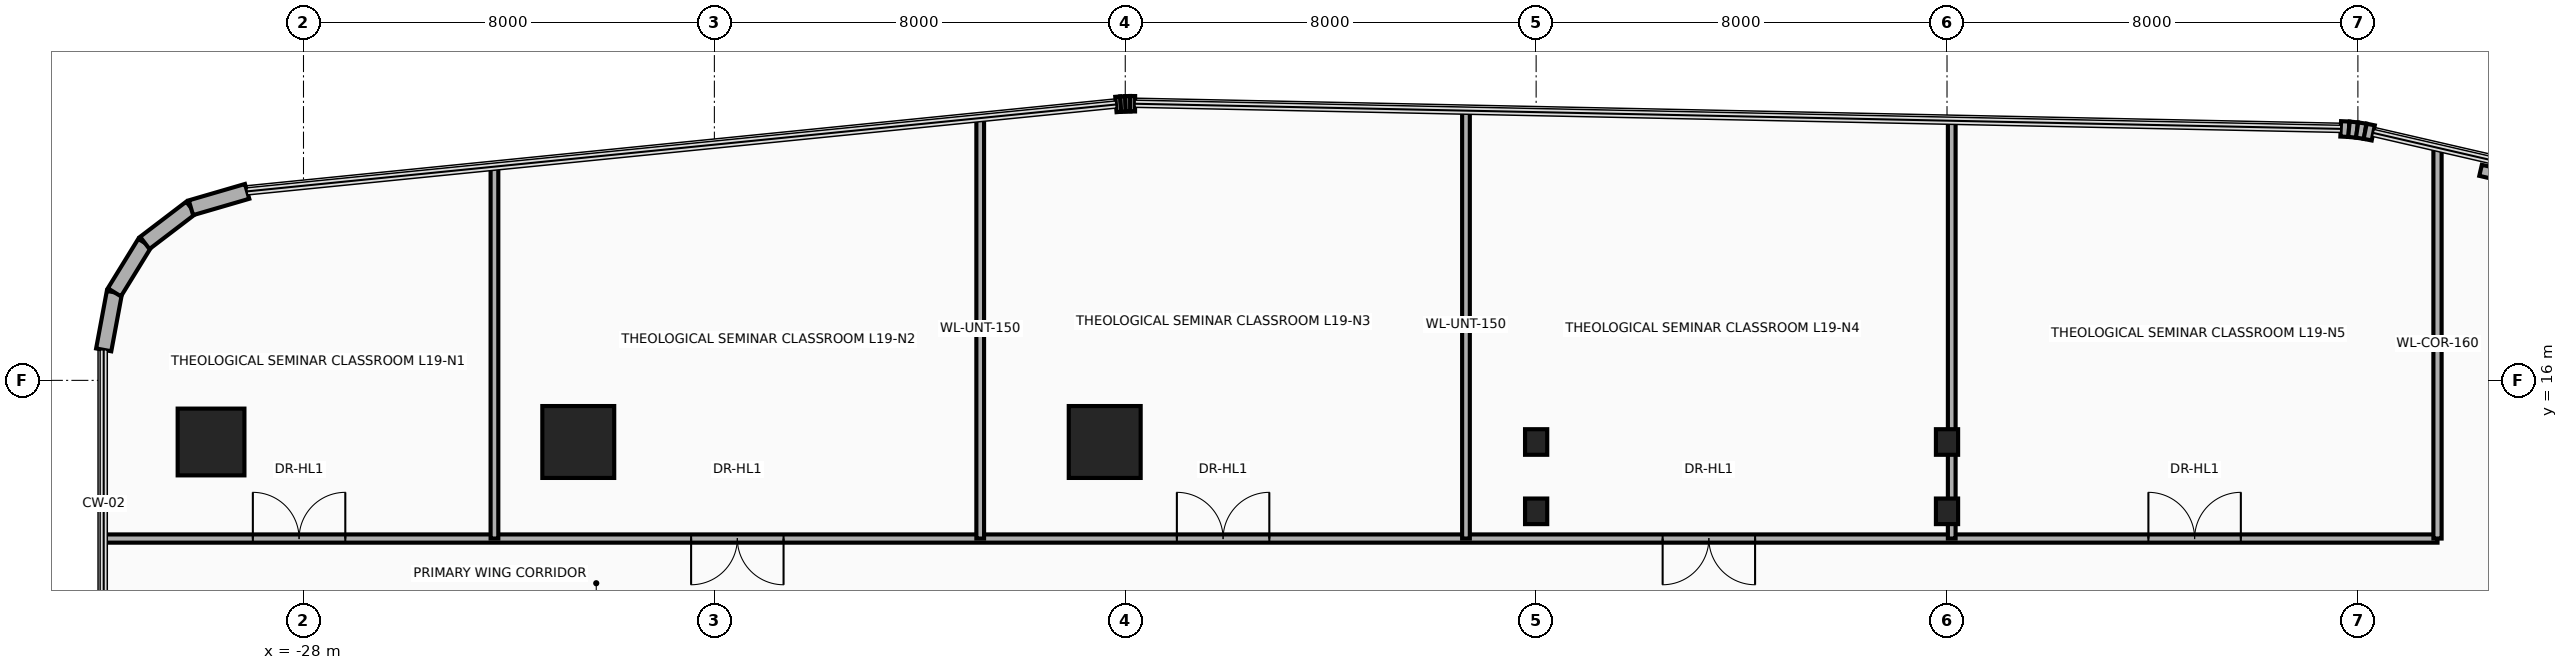
"""IFC4 building model, lengths in metres.
Left out: names, types, materials, properties, quantities, classifications, styles, units other than length and angle.
Written with IfcOpenShell. Run it as: python <this file> out.ifc"""

import sys

from ifc_helpers import new_model, si_unit, direction, frame, frame_2d, origin, origin_2d, place, context, subcontext, project, spatial, rectangle, circle, i_section, extrude, source, transform, mapped, element, fill, save


model = new_model("IFC4")
c1 = context("Model", 3, precision=1e-05, world=origin(), true_north=direction((0.0, 1.0)))
c2 = subcontext(c1, "Body", "Model", "MODEL_VIEW")
j1 = project(units=[si_unit("LENGTHUNIT", "METRE"), si_unit("PLANEANGLEUNIT", "RADIAN")], contexts=[c1])
p1 = place(None, origin())
s1 = spatial("IfcSite", under=j1, at=p1, CompositionType="ELEMENT")
p2 = place(p1, origin())
s2 = spatial("IfcBuilding", under=s1, at=p2, CompositionType="ELEMENT")
p3 = place(p2, frame((0.0, 0.0, 77.8)))
s3 = spatial("IfcBuildingStorey", under=s2, at=p3, CompositionType="ELEMENT", Elevation=77.8)
m1 = source(origin(), c2, "Body", "SweptSolid", [
    extrude(circle(Radius=0.65, at=origin_2d()), origin(), (0.0, 0.0, 1.0), 3.7),
])
p4 = place(p3, frame((-29.8, 14.8, 0.0), z_axis=(0.0, 0.0, 1.0), x_axis=(1.0, 0.0, 0.0)))
e1 = element("IfcColumn", 1, at=p4, inside=s3, PredefinedType="COLUMN", context=c2, shape_type="MappedRepresentation", body=[
    mapped(m1, transform((0.0, 0.0, 0.0), x_axis=(1.0, 0.0, 0.0), y_axis=(0.0, 1.0, 0.0), z_axis=(0.0, 0.0, 1.0), scale=1.0)),
])
m2 = source(origin(), c2, "Body", "SweptSolid", [
    extrude(rectangle(XDim=1.4, YDim=1.4, at=origin_2d()), origin(), (0.0, 0.0, 1.0), 3.7),
])
for number, where, z_axis, x_axis in (
    (2, (-22.65, 14.8, 0.0), (0.0, 0.0, 1.0), (1.0, 0.0, 0.0)),
    (3, (-12.4, 14.8, 0.0), (0.0, 0.0, 1.0), (1.0, 0.0, 0.0)),
):
    element("IfcColumn", number, at=place(p3, frame(where, z_axis=z_axis, x_axis=x_axis)), inside=s3, PredefinedType="COLUMN", context=c2, shape_type="MappedRepresentation", body=[
        mapped(m2, transform((0.0, 0.0, 0.0), x_axis=(1.0, 0.0, 0.0), y_axis=(0.0, 1.0, 0.0), z_axis=(0.0, 0.0, 1.0), scale=1.0)),
    ])
m3 = source(origin(), c2, "Body", "SweptSolid", [
    extrude(i_section(OverallWidth=0.432, OverallDepth=0.498, WebThickness=0.056, FlangeThickness=0.089, at=origin_2d()), origin(), (0.0, 0.0, 1.0), 3.7),
])
for number, where, z_axis, x_axis in (
    (4, (-4.0, 13.45, 0.0), (0.0, 0.0, 1.0), (1.0, 0.0, 0.0)),
    (5, (-4.0, 14.8, 0.0), (0.0, 0.0, 1.0), (1.0, 0.0, 0.0)),
    (6, (4.0, 13.45, 0.0), (0.0, 0.0, 1.0), (1.0, 0.0, 0.0)),
    (7, (4.0, 14.8, 0.0), (0.0, 0.0, 1.0), (1.0, 0.0, 0.0)),
):
    element("IfcColumn", number, at=place(p3, frame(where, z_axis=z_axis, x_axis=x_axis)), inside=s3, PredefinedType="COLUMN", context=c2, shape_type="MappedRepresentation", body=[
        mapped(m3, transform((0.0, 0.0, 0.0), x_axis=(1.0, 0.0, 0.0), y_axis=(0.0, 1.0, 0.0), z_axis=(0.0, 0.0, 1.0), scale=1.0)),
    ])
p5 = place(p3, frame((-31.89, 16.594, 0.0), z_axis=(0.0, 0.0, 1.0), x_axis=(0.182748995683, 0.9831596028, 0.0)))
e8 = element("IfcWall", 8, at=p5, inside=s3, PredefinedType="SOLIDWALL", context=c2, shape_type="SweptSolid", body=[
    extrude(rectangle(XDim=1.14, YDim=0.3, at=frame_2d((0.57, 0.0))), origin(), (0.0, 0.0, 1.0), 3.46),
])
p6 = place(p3, frame((-31.682, 17.714, 0.0), z_axis=(0.0, 0.0, 1.0), x_axis=(0.524157723014, 0.8516212077, 0.0)))
e9 = element("IfcWall", 9, at=p6, inside=s3, PredefinedType="SOLIDWALL", context=c2, shape_type="SweptSolid", body=[
    extrude(rectangle(XDim=1.129, YDim=0.3, at=frame_2d((0.565, 0.0))), origin(), (0.0, 0.0, 1.0), 3.46),
])
p7 = place(p3, frame((-31.09, 18.676, 0.0), z_axis=(0.0, 0.0, 1.0), x_axis=(0.795253002434, 0.606277710393, 0.0)))
e10 = element("IfcWall", 10, at=p7, inside=s3, PredefinedType="SOLIDWALL", context=c2, shape_type="SweptSolid", body=[
    extrude(rectangle(XDim=1.129, YDim=0.3, at=frame_2d((0.564, 0.0))), origin(), (0.0, 0.0, 1.0), 3.46),
])
p8 = place(p3, frame((-30.192, 19.361, 0.0), z_axis=(0.0, 0.0, 1.0), x_axis=(0.960071941549, 0.279753225271, 0.0)))
e11 = element("IfcWall", 11, at=p8, inside=s3, PredefinedType="SOLIDWALL", context=c2, shape_type="SweptSolid", body=[
    extrude(rectangle(XDim=1.14, YDim=0.3, at=frame_2d((0.57, 0.0))), origin(), (0.0, 0.0, 1.0), 3.46),
])
p9 = place(p3, frame((-12.182, 21.371, 0.0), z_axis=(0.0, 0.0, 1.0), x_axis=(0.996527790842, 0.08326080759, 0.0)))
e12 = element("IfcWall", 12, at=p9, inside=s3, PredefinedType="SOLIDWALL", context=c2, shape_type="SweptSolid", body=[
    extrude(rectangle(XDim=0.094, YDim=0.3, at=frame_2d((0.047, 0.0))), origin(), (0.0, 0.0, 1.0), 3.46),
])
p10 = place(p3, frame((-12.088, 21.379, 0.0), z_axis=(0.0, 0.0, 1.0), x_axis=(0.998476480444, 0.055178963393, 0.0)))
e13 = element("IfcWall", 13, at=p10, inside=s3, PredefinedType="SOLIDWALL", context=c2, shape_type="SweptSolid", body=[
    extrude(rectangle(XDim=0.093, YDim=0.3, at=frame_2d((0.046, 0.0))), origin(), (0.0, 0.0, 1.0), 3.46),
])
p11 = place(p3, frame((-11.996, 21.384, 0.0), z_axis=(0.0, 0.0, 1.0), x_axis=(0.999722573757, 0.023553673204, 0.0)))
e14 = element("IfcWall", 14, at=p11, inside=s3, PredefinedType="SOLIDWALL", context=c2, shape_type="SweptSolid", body=[
    extrude(rectangle(XDim=0.093, YDim=0.3, at=frame_2d((0.047, 0.0))), origin(), (0.0, 0.0, 1.0), 3.46),
])
p12 = place(p3, frame((-11.902, 21.386, 0.0), z_axis=(0.0, 0.0, 1.0), x_axis=(0.999986507273, -0.005194735103, 0.0)))
e15 = element("IfcWall", 15, at=p12, inside=s3, PredefinedType="SOLIDWALL", context=c2, shape_type="SweptSolid", body=[
    extrude(rectangle(XDim=0.094, YDim=0.3, at=frame_2d((0.047, 0.0))), origin(), (0.0, 0.0, 1.0), 3.46),
])
p13 = place(p3, frame((11.666, 20.897, 0.0), z_axis=(0.0, 0.0, 1.0), x_axis=(0.998885297239, -0.047203421059, 0.0)))
e16 = element("IfcWall", 16, at=p13, inside=s3, PredefinedType="SOLIDWALL", context=c2, shape_type="SweptSolid", body=[
    extrude(rectangle(XDim=0.16, YDim=0.3, at=frame_2d((0.08, 0.0))), origin(), (0.0, 0.0, 1.0), 3.46),
])
p14 = place(p3, frame((11.826, 20.889, 0.0), z_axis=(0.0, 0.0, 1.0), x_axis=(0.995172891136, -0.098137234257, 0.0)))
e17 = element("IfcWall", 17, at=p14, inside=s3, PredefinedType="SOLIDWALL", context=c2, shape_type="SweptSolid", body=[
    extrude(rectangle(XDim=0.159, YDim=0.3, at=frame_2d((0.08, 0.0))), origin(), (0.0, 0.0, 1.0), 3.46),
])
p15 = place(p3, frame((11.984, 20.874, 0.0), z_axis=(0.0, 0.0, 1.0), x_axis=(0.988846069207, -0.148941100486, 0.0)))
e18 = element("IfcWall", 18, at=p15, inside=s3, PredefinedType="SOLIDWALL", context=c2, shape_type="SweptSolid", body=[
    extrude(rectangle(XDim=0.159, YDim=0.3, at=frame_2d((0.08, 0.0))), origin(), (0.0, 0.0, 1.0), 3.46),
])
p16 = place(p3, frame((12.142, 20.85, 0.0), z_axis=(0.0, 0.0, 1.0), x_axis=(0.979991950448, -0.19903712482, 0.0)))
e19 = element("IfcWall", 19, at=p16, inside=s3, PredefinedType="SOLIDWALL", context=c2, shape_type="SweptSolid", body=[
    extrude(rectangle(XDim=0.161, YDim=0.3, at=frame_2d((0.08, 0.0))), origin(), (0.0, 0.0, 1.0), 3.46),
])
p17 = place(p3, frame((14.389, 20.09, 0.0), z_axis=(0.0, 0.0, 1.0), x_axis=(0.974400545997, -0.224818984875, 0.0)))
e20 = element("IfcWall", 20, at=p17, inside=s3, PredefinedType="SOLIDWALL", context=c2, shape_type="SweptSolid", body=[
    extrude(rectangle(XDim=2.2, YDim=0.22, at=frame_2d((1.1, 0.0))), origin(), (0.0, 0.0, 1.0), 3.46),
])
p18 = place(p17, frame((0.65, 0.0, 0.95)))
e21 = element("IfcOpeningElement", 21, at=p18, cuts=e20, PredefinedType="OPENING", context=c2, shape_type="SweptSolid", body=[
    extrude(rectangle(XDim=0.9, YDim=1.3, at=frame_2d((0.45, 0.65))), frame((0.0, 0.125, 0.0), z_axis=(0.0, -1.0, 0.0), x_axis=(1.0, 0.0, 0.0)), (0.0, 0.0, 1.0), 0.25),
])
p19 = place(p3, frame((-31.89, 12.92, 0.0), z_axis=(0.0, 0.0, 1.0), x_axis=(1.0, 0.0, 0.0)))
e22 = element("IfcWall", 22, at=p19, inside=s3, PredefinedType="PARTITIONING", context=c2, shape_type="SweptSolid", body=[
    extrude(rectangle(XDim=45.44, YDim=0.16, at=frame_2d((22.72, 0.0))), origin(), (0.0, 0.0, 1.0), 2.583),
])
p20 = place(p19, frame((2.904, 0.0, 0.0)))
e23 = element("IfcOpeningElement", 23, at=p20, cuts=e22, PredefinedType="OPENING", context=c2, shape_type="SweptSolid", body=[
    extrude(rectangle(XDim=1.8, YDim=2.15, at=frame_2d((0.9, 1.075))), frame((0.0, 0.095, 0.0), z_axis=(0.0, -1.0, 0.0), x_axis=(1.0, 0.0, 0.0)), (0.0, 0.0, 1.0), 0.19),
])
p21 = place(p19, frame((11.437, 0.0, 0.0)))
e24 = element("IfcOpeningElement", 24, at=p21, cuts=e22, PredefinedType="OPENING", context=c2, shape_type="SweptSolid", body=[
    extrude(rectangle(XDim=1.8, YDim=2.15, at=frame_2d((0.9, 1.075))), frame((0.0, 0.095, 0.0), z_axis=(0.0, -1.0, 0.0), x_axis=(1.0, 0.0, 0.0)), (0.0, 0.0, 1.0), 0.19),
])
p22 = place(p19, frame((20.895, 0.0, 0.0)))
e25 = element("IfcOpeningElement", 25, at=p22, cuts=e22, PredefinedType="OPENING", context=c2, shape_type="SweptSolid", body=[
    extrude(rectangle(XDim=1.8, YDim=2.15, at=frame_2d((0.9, 1.075))), frame((0.0, 0.095, 0.0), z_axis=(0.0, -1.0, 0.0), x_axis=(1.0, 0.0, 0.0)), (0.0, 0.0, 1.0), 0.19),
])
p23 = place(p19, frame((30.353, 0.0, 0.0)))
e26 = element("IfcOpeningElement", 26, at=p23, cuts=e22, PredefinedType="OPENING", context=c2, shape_type="SweptSolid", body=[
    extrude(rectangle(XDim=1.8, YDim=2.15, at=frame_2d((0.9, 1.075))), frame((0.0, 0.095, 0.0), z_axis=(0.0, -1.0, 0.0), x_axis=(1.0, 0.0, 0.0)), (0.0, 0.0, 1.0), 0.19),
])
p24 = place(p19, frame((39.811, 0.0, 0.0)))
e27 = element("IfcOpeningElement", 27, at=p24, cuts=e22, PredefinedType="OPENING", context=c2, shape_type="SweptSolid", body=[
    extrude(rectangle(XDim=1.8, YDim=2.15, at=frame_2d((0.9, 1.075))), frame((0.0, 0.095, 0.0), z_axis=(0.0, -1.0, 0.0), x_axis=(1.0, 0.0, 0.0)), (0.0, 0.0, 1.0), 0.19),
])
p25 = place(p3, frame((13.55, 12.92, 0.0), z_axis=(0.0, 0.0, 1.0), x_axis=(0.0, 1.0, 0.0)))
e28 = element("IfcWall", 28, at=p25, inside=s3, PredefinedType="PARTITIONING", context=c2, shape_type="SweptSolid", body=[
    extrude(rectangle(XDim=7.609, YDim=0.16, at=frame_2d((3.805, 0.0))), origin(), (0.0, 0.0, 1.0), 2.583),
])
p26 = place(p3, frame((-24.282, 12.92, 0.0), z_axis=(0.0, 0.0, 1.0), x_axis=(0.0, 1.0, 0.0)))
e29 = element("IfcWall", 29, at=p26, inside=s3, PredefinedType="PARTITIONING", context=c2, shape_type="SweptSolid", body=[
    extrude(rectangle(XDim=7.241, YDim=0.15, at=frame_2d((3.621, 0.0))), origin(), (0.0, 0.0, 1.0), 2.583),
])
p27 = place(p3, frame((-14.824, 12.92, 0.0), z_axis=(0.0, 0.0, 1.0), x_axis=(0.0, 1.0, 0.0)))
e30 = element("IfcWall", 30, at=p27, inside=s3, PredefinedType="PARTITIONING", context=c2, shape_type="SweptSolid", body=[
    extrude(rectangle(XDim=8.187, YDim=0.15, at=frame_2d((4.094, 0.0))), origin(), (0.0, 0.0, 1.0), 2.583),
])
p28 = place(p3, frame((-5.366, 12.92, 0.0), z_axis=(0.0, 0.0, 1.0), x_axis=(0.0, 1.0, 0.0)))
e31 = element("IfcWall", 31, at=p28, inside=s3, PredefinedType="PARTITIONING", context=c2, shape_type="SweptSolid", body=[
    extrude(rectangle(XDim=8.332, YDim=0.15, at=frame_2d((4.166, 0.0))), origin(), (0.0, 0.0, 1.0), 2.583),
])
p29 = place(p3, frame((4.092, 12.92, 0.0), z_axis=(0.0, 0.0, 1.0), x_axis=(0.0, 1.0, 0.0)))
e32 = element("IfcWall", 32, at=p29, inside=s3, PredefinedType="PARTITIONING", context=c2, shape_type="SweptSolid", body=[
    extrude(rectangle(XDim=8.135, YDim=0.15, at=frame_2d((4.067, 0.0))), origin(), (0.0, 0.0, 1.0), 2.583),
])
p30 = place(p20, origin())
e33 = element("IfcDoor", 33, at=p30, inside=s3, OperationType="DOUBLE_DOOR_SINGLE_SWING", PredefinedType="DOOR", context=c2, shape_type="SweptSolid", body=[
    extrude(rectangle(XDim=1.8, YDim=2.15, at=frame_2d((0.9, 1.075))), frame((0.0, 0.025, 0.0), z_axis=(0.0, -1.0, 0.0), x_axis=(1.0, 0.0, 0.0)), (0.0, 0.0, 1.0), 0.05),
])
fill(e23, e33)
p31 = place(p21, frame((1.8, 0.0, 0.0), z_axis=(0.0, 0.0, 1.0), x_axis=(-1.0, 0.0, 0.0)))
e34 = element("IfcDoor", 34, at=p31, inside=s3, OperationType="DOUBLE_DOOR_SINGLE_SWING", PredefinedType="DOOR", context=c2, shape_type="SweptSolid", body=[
    extrude(rectangle(XDim=1.8, YDim=2.15, at=frame_2d((0.9, 1.075))), frame((0.0, 0.025, 0.0), z_axis=(0.0, -1.0, 0.0), x_axis=(1.0, 0.0, 0.0)), (0.0, 0.0, 1.0), 0.05),
])
fill(e24, e34)
p32 = place(p22, origin())
e35 = element("IfcDoor", 35, at=p32, inside=s3, OperationType="DOUBLE_DOOR_SINGLE_SWING", PredefinedType="DOOR", context=c2, shape_type="SweptSolid", body=[
    extrude(rectangle(XDim=1.8, YDim=2.15, at=frame_2d((0.9, 1.075))), frame((0.0, 0.025, 0.0), z_axis=(0.0, -1.0, 0.0), x_axis=(1.0, 0.0, 0.0)), (0.0, 0.0, 1.0), 0.05),
])
fill(e25, e35)
p33 = place(p23, frame((1.8, 0.0, 0.0), z_axis=(0.0, 0.0, 1.0), x_axis=(-1.0, 0.0, 0.0)))
e36 = element("IfcDoor", 36, at=p33, inside=s3, OperationType="DOUBLE_DOOR_SINGLE_SWING", PredefinedType="DOOR", context=c2, shape_type="SweptSolid", body=[
    extrude(rectangle(XDim=1.8, YDim=2.15, at=frame_2d((0.9, 1.075))), frame((0.0, 0.025, 0.0), z_axis=(0.0, -1.0, 0.0), x_axis=(1.0, 0.0, 0.0)), (0.0, 0.0, 1.0), 0.05),
])
fill(e26, e36)
p34 = place(p24, origin())
e37 = element("IfcDoor", 37, at=p34, inside=s3, OperationType="DOUBLE_DOOR_SINGLE_SWING", PredefinedType="DOOR", context=c2, shape_type="SweptSolid", body=[
    extrude(rectangle(XDim=1.8, YDim=2.15, at=frame_2d((0.9, 1.075))), frame((0.0, 0.025, 0.0), z_axis=(0.0, -1.0, 0.0), x_axis=(1.0, 0.0, 0.0)), (0.0, 0.0, 1.0), 0.05),
])
fill(e27, e37)
save(model, sys.argv[1])
